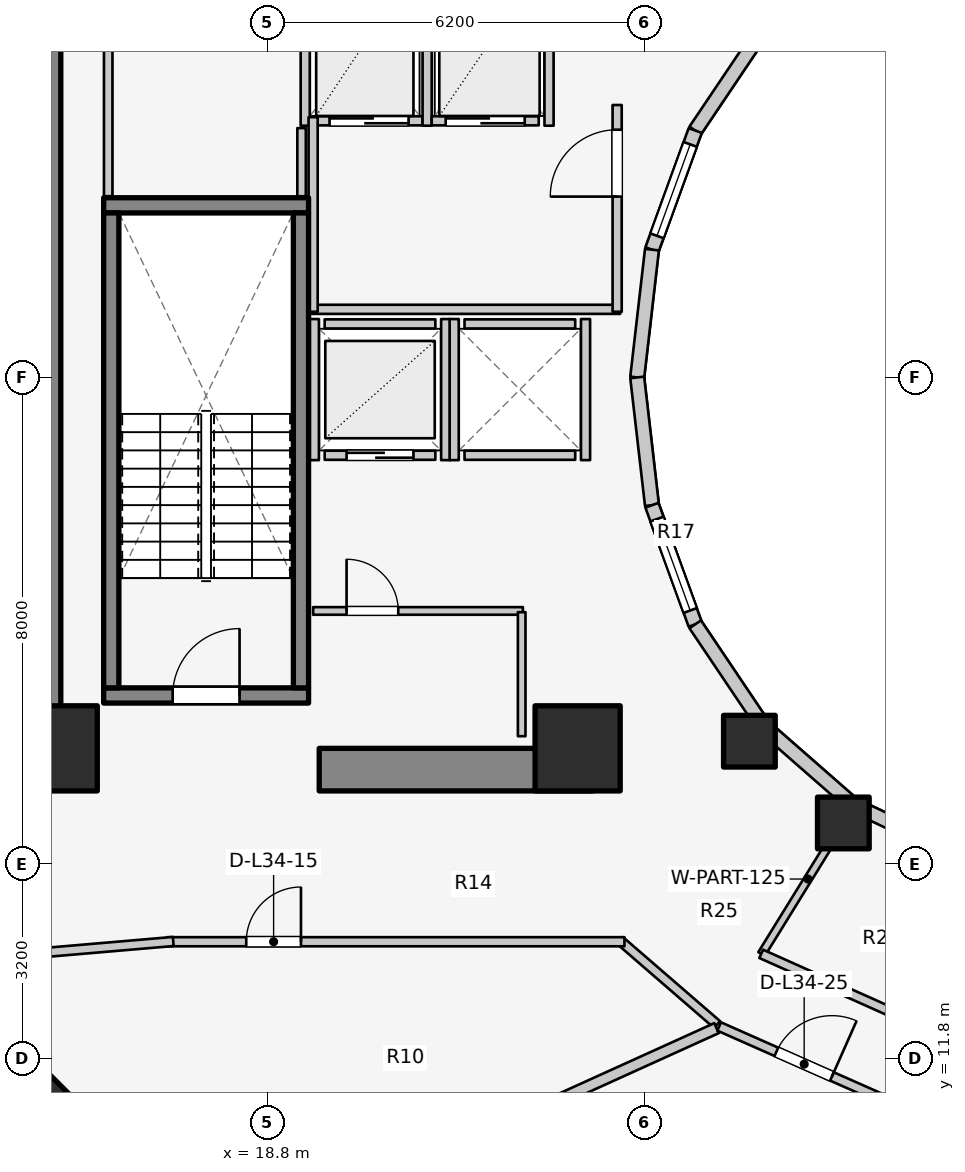
"""IFC4 building model, lengths in metres.
Left out: names, types, materials, properties, quantities, classifications, styles, units other than length and angle.
Written with IfcOpenShell. Run it as: python <this file> out.ifc"""

import sys

from ifc_helpers import new_model, si_unit, direction, frame, frame_2d, origin, origin_2d, place, context, subcontext, project, spatial, rectangle, extrude, element, fill, save


model = new_model("IFC4")
c1 = context("Model", 3, precision=1e-05, world=origin(), true_north=direction((0.0, 1.0)))
c2 = subcontext(c1, "Body", "Model", "MODEL_VIEW")
j1 = project(units=[si_unit("LENGTHUNIT", "METRE"), si_unit("PLANEANGLEUNIT", "RADIAN")], contexts=[c1])
p1 = place(None, origin())
s1 = spatial("IfcSite", under=j1, at=p1, CompositionType="ELEMENT")
p2 = place(p1, origin())
s2 = spatial("IfcBuilding", under=s1, at=p2, CompositionType="ELEMENT")
p3 = place(p2, frame((0.0, 0.0, 113.5)))
s3 = spatial("IfcBuildingStorey", under=s2, at=p3, CompositionType="ELEMENT", Elevation=113.5)
p4 = place(p3, frame((15.05, 17.05, 0.0), z_axis=(0.0, 0.0, 1.0), x_axis=(0.0, 1.0, 0.0)))
e1 = element("IfcWall", 1, at=p4, inside=s3, PredefinedType="SHEAR", context=c2, shape_type="SweptSolid", body=[
    extrude(rectangle(XDim=12.8, YDim=0.7, at=frame_2d((6.4, 0.0))), origin(), (0.0, 0.0, 1.0), 3.1),
])
p5 = place(p3, frame((19.65, 16.55, 0.0), z_axis=(0.0, 0.0, 1.0), x_axis=(1.0, 0.0, 0.0)))
e2 = element("IfcWall", 2, at=p5, inside=s3, PredefinedType="SHEAR", context=c2, shape_type="SweptSolid", body=[
    extrude(rectangle(XDim=4.5, YDim=0.7, at=frame_2d((2.25, 0.0))), origin(), (0.0, 0.0, 1.0), 3.1),
])
p6 = place(p3, frame((16.105, 17.77, 0.0), z_axis=(0.0, 0.0, 1.0), x_axis=(1.0, 0.0, 0.0)))
e3 = element("IfcWall", 3, at=p6, inside=s3, PredefinedType="SOLIDWALL", context=c2, shape_type="SweptSolid", body=[
    extrude(rectangle(XDim=3.37, YDim=0.25, at=frame_2d((1.685, 0.0))), origin(), (0.0, 0.0, 1.0), 3.1),
])
p7 = place(p6, frame((1.135, 0.0, 0.0)))
e4 = element("IfcOpeningElement", 4, at=p7, cuts=e3, PredefinedType="OPENING", context=c2, shape_type="SweptSolid", body=[
    extrude(rectangle(XDim=1.1, YDim=2.1, at=frame_2d((0.55, 1.05))), frame((0.0, 0.135, 0.0), z_axis=(0.0, -1.0, 0.0), x_axis=(1.0, 0.0, 0.0)), (0.0, 0.0, 1.0), 0.27),
])
p8 = place(p3, frame((16.105, 25.83, 0.0), z_axis=(0.0, 0.0, 1.0), x_axis=(1.0, 0.0, 0.0)))
e5 = element("IfcWall", 5, at=p8, inside=s3, PredefinedType="SOLIDWALL", context=c2, shape_type="SweptSolid", body=[
    extrude(rectangle(XDim=3.37, YDim=0.25, at=frame_2d((1.685, 0.0))), origin(), (0.0, 0.0, 1.0), 3.1),
])
for number, where, z_axis, x_axis in (
    (6, (16.23, 17.895, 0.0), (0.0, 0.0, 1.0), (0.0, 1.0, 0.0)),
    (7, (19.35, 17.895, 0.0), (0.0, 0.0, 1.0), (0.0, 1.0, 0.0)),
):
    element("IfcWall", number, at=place(p3, frame(where, z_axis=z_axis, x_axis=x_axis)), inside=s3, PredefinedType="SOLIDWALL", context=c2, shape_type="SweptSolid", body=[
        extrude(rectangle(XDim=7.81, YDim=0.25, at=frame_2d((3.905, 0.0))), origin(), (0.0, 0.0, 1.0), 3.1),
    ])
for number, where, z_axis, x_axis in (
    (8, (15.3, 16.9, 0.0), (0.0, 0.0, 1.0), (1.0, 0.0, 0.0)),
    (9, (23.9, 16.9, 0.0), (0.0, 0.0, 1.0), (1.0, 0.0, 0.0)),
):
    element("IfcColumn", number, at=place(p3, frame(where, z_axis=z_axis, x_axis=x_axis)), inside=s3, PredefinedType="COLUMN", context=c2, shape_type="SweptSolid", body=[
        extrude(rectangle(XDim=1.4, YDim=1.4, at=origin_2d()), origin(), (0.0, 0.0, 1.0), 3.1),
    ])
p9 = place(p3, frame((26.725, 17.018, 0.0), z_axis=(0.0, 0.0, 1.0), x_axis=(1.0, 0.0, 0.0)))
e10 = element("IfcColumn", 10, at=p9, inside=s3, PredefinedType="COLUMN", context=c2, shape_type="SweptSolid", body=[
    extrude(rectangle(XDim=0.85, YDim=0.85, at=origin_2d()), origin(), (0.0, 0.0, 1.0), 3.1),
])
p10 = place(p3, frame((15.147, 10.862, 0.0), z_axis=(0.0, 0.0, 1.0), x_axis=(-0.707106781187, -0.707106781187, 0.0)))
e11 = element("IfcColumn", 11, at=p10, inside=s3, PredefinedType="COLUMN", context=c2, shape_type="SweptSolid", body=[
    extrude(rectangle(XDim=1.05, YDim=1.05, at=origin_2d()), origin(), (0.0, 0.0, 1.0), 3.1),
])
p11 = place(p3, frame((28.27, 15.673, 0.0), z_axis=(0.0, 0.0, 1.0), x_axis=(1.0, 0.0, 0.0)))
e12 = element("IfcColumn", 12, at=p11, inside=s3, PredefinedType="COLUMN", context=c2, shape_type="SweptSolid", body=[
    extrude(rectangle(XDim=0.85, YDim=0.85, at=origin_2d()), origin(), (0.0, 0.0, 1.0), 3.1),
])
p12 = place(p3, frame((26.965, 28.742, 0.0), z_axis=(0.0, 0.0, 1.0), x_axis=(-0.558197800898, -0.829707909492, 0.0)))
e13 = element("IfcWall", 13, at=p12, inside=s3, PredefinedType="STANDARD", context=c2, shape_type="SweptSolid", body=[
    extrude(rectangle(XDim=2.027, YDim=0.23, at=frame_2d((1.013, 0.0))), origin(), (0.0, 0.0, 1.0), 2.16),
])
p13 = place(p3, frame((25.834, 27.06, 0.0), z_axis=(0.0, 0.0, 1.0), x_axis=(-0.341423187295, -0.93990968033, 0.0)))
e14 = element("IfcWall", 14, at=p13, inside=s3, PredefinedType="STANDARD", context=c2, shape_type="SweptSolid", body=[
    extrude(rectangle(XDim=2.084, YDim=0.23, at=frame_2d((1.042, 0.0))), origin(), (0.0, 0.0, 1.0), 2.84),
])
p14 = place(p13, frame((0.242, 0.0, 0.85)))
e15 = element("IfcOpeningElement", 15, at=p14, cuts=e14, PredefinedType="OPENING", context=c2, shape_type="SweptSolid", body=[
    extrude(rectangle(XDim=1.6, YDim=1.65, at=frame_2d((0.8, 0.825))), frame((0.0, 0.125, 0.0), z_axis=(0.0, -1.0, 0.0), x_axis=(1.0, 0.0, 0.0)), (0.0, 0.0, 1.0), 0.25),
])
for number, where, z_axis, x_axis in (
    (16, (25.123, 25.102, 0.0), (0.0, 0.0, 1.0), (-0.115, -0.993, 0.0)),
    (17, (24.88, 23.0, 0.0), (0.0, 0.0, 1.0), (0.115, -0.993, 0.0)),
):
    element("IfcWall", number, at=place(p3, frame(where, z_axis=z_axis, x_axis=x_axis)), inside=s3, PredefinedType="STANDARD", context=c2, shape_type="SweptSolid", body=[
        extrude(rectangle(XDim=2.115, YDim=0.23, at=frame_2d((1.058, 0.0))), origin(), (0.0, 0.0, 1.0), 2.84),
    ])
p15 = place(p3, frame((25.123, 20.898, 0.0), z_axis=(0.0, 0.0, 1.0), x_axis=(0.341423187295, -0.93990968033, 0.0)))
e18 = element("IfcWall", 18, at=p15, inside=s3, PredefinedType="STANDARD", context=c2, shape_type="SweptSolid", body=[
    extrude(rectangle(XDim=2.084, YDim=0.23, at=frame_2d((1.042, 0.0))), origin(), (0.0, 0.0, 1.0), 2.84),
])
p16 = place(p15, frame((0.242, 0.0, 0.85)))
e19 = element("IfcOpeningElement", 19, at=p16, cuts=e18, PredefinedType="OPENING", context=c2, shape_type="SweptSolid", body=[
    extrude(rectangle(XDim=1.6, YDim=1.65, at=frame_2d((0.8, 0.825))), frame((0.0, 0.125, 0.0), z_axis=(0.0, -1.0, 0.0), x_axis=(1.0, 0.0, 0.0)), (0.0, 0.0, 1.0), 0.25),
])
p17 = place(p3, frame((25.834, 18.94, 0.0), z_axis=(0.0, 0.0, 1.0), x_axis=(0.558197800898, -0.829707909492, 0.0)))
e20 = element("IfcWall", 20, at=p17, inside=s3, PredefinedType="STANDARD", context=c2, shape_type="SweptSolid", body=[
    extrude(rectangle(XDim=2.027, YDim=0.23, at=frame_2d((1.013, 0.0))), origin(), (0.0, 0.0, 1.0), 2.16),
])
p18 = place(p3, frame((26.965, 17.258, 0.0), z_axis=(0.0, 0.0, 1.0), x_axis=(0.752576694707, -0.658504607869, 0.0)))
e21 = element("IfcWall", 21, at=p18, inside=s3, PredefinedType="STANDARD", context=c2, shape_type="SweptSolid", body=[
    extrude(rectangle(XDim=1.959, YDim=0.23, at=frame_2d((0.98, 0.0))), origin(), (0.0, 0.0, 1.0), 2.16),
])
p19 = place(p3, frame((28.44, 15.968, 0.0), z_axis=(0.0, 0.0, 1.0), x_axis=(0.904179699603, -0.427152280606, 0.0)))
e22 = element("IfcWall", 22, at=p19, inside=s3, PredefinedType="STANDARD", context=c2, shape_type="SweptSolid", body=[
    extrude(rectangle(XDim=1.899, YDim=0.23, at=frame_2d((0.95, 0.0))), origin(), (0.0, 0.0, 1.0), 2.16),
])
p20 = place(p3, frame((19.74, 21.72, 0.0), z_axis=(0.0, 0.0, 1.0), x_axis=(1.0, 0.0, 0.0)))
e23 = element("IfcWall", 23, at=p20, inside=s3, PredefinedType="SOLIDWALL", context=c2, shape_type="SweptSolid", body=[
    extrude(rectangle(XDim=1.82, YDim=0.15, at=frame_2d((0.91, 0.0))), origin(), (0.0, 0.0, 1.0), 2.855),
])
p21 = place(p20, frame((0.36, 0.0, 0.0)))
e24 = element("IfcOpeningElement", 24, at=p21, cuts=e23, PredefinedType="OPENING", context=c2, shape_type="SweptSolid", body=[
    extrude(rectangle(XDim=1.1, YDim=2.1, at=frame_2d((0.55, 1.05))), frame((0.0, 0.085, 0.0), z_axis=(0.0, -1.0, 0.0), x_axis=(1.0, 0.0, 0.0)), (0.0, 0.0, 1.0), 0.17),
])
p22 = place(p3, frame((19.74, 23.88, 0.0), z_axis=(0.0, 0.0, 1.0), x_axis=(1.0, 0.0, 0.0)))
e25 = element("IfcWall", 25, at=p22, inside=s3, PredefinedType="SOLIDWALL", context=c2, shape_type="SweptSolid", body=[
    extrude(rectangle(XDim=1.82, YDim=0.15, at=frame_2d((0.91, 0.0))), origin(), (0.0, 0.0, 1.0), 2.855),
])
for number, where, z_axis, x_axis in (
    (26, (19.57, 21.64, 0.0), (0.0, 0.0, 1.0), (0.0, 1.0, 0.0)),
    (27, (21.73, 21.64, 0.0), (0.0, 0.0, 1.0), (0.0, 1.0, 0.0)),
):
    element("IfcWall", number, at=place(p3, frame(where, z_axis=z_axis, x_axis=x_axis)), inside=s3, PredefinedType="SOLIDWALL", context=c2, shape_type="SweptSolid", body=[
        extrude(rectangle(XDim=2.32, YDim=0.15, at=frame_2d((1.16, 0.0))), origin(), (0.0, 0.0, 1.0), 2.855),
    ])
for number, where, z_axis, x_axis in (
    (28, (22.04, 21.72, 0.0), (0.0, 0.0, 1.0), (1.0, 0.0, 0.0)),
    (29, (22.04, 23.88, 0.0), (0.0, 0.0, 1.0), (1.0, 0.0, 0.0)),
):
    element("IfcWall", number, at=place(p3, frame(where, z_axis=z_axis, x_axis=x_axis)), inside=s3, PredefinedType="SOLIDWALL", context=c2, shape_type="SweptSolid", body=[
        extrude(rectangle(XDim=1.82, YDim=0.15, at=frame_2d((0.91, 0.0))), origin(), (0.0, 0.0, 1.0), 2.12),
    ])
p23 = place(p3, frame((21.87, 21.64, 0.0), z_axis=(0.0, 0.0, 1.0), x_axis=(0.0, 1.0, 0.0)))
e30 = element("IfcWall", 30, at=p23, inside=s3, PredefinedType="SOLIDWALL", context=c2, shape_type="SweptSolid", body=[
    extrude(rectangle(XDim=2.32, YDim=0.15, at=frame_2d((1.16, 0.0))), origin(), (0.0, 0.0, 1.0), 2.855),
])
p24 = place(p3, frame((24.03, 21.64, 0.0), z_axis=(0.0, 0.0, 1.0), x_axis=(0.0, 1.0, 0.0)))
e31 = element("IfcWall", 31, at=p24, inside=s3, PredefinedType="SOLIDWALL", context=c2, shape_type="SweptSolid", body=[
    extrude(rectangle(XDim=2.32, YDim=0.15, at=frame_2d((1.16, 0.0))), origin(), (0.0, 0.0, 1.0), 2.12),
])
p25 = place(p3, frame((19.59, 27.22, 0.0), z_axis=(0.0, 0.0, 1.0), x_axis=(1.0, 0.0, 0.0)))
e32 = element("IfcWall", 32, at=p25, inside=s3, PredefinedType="SOLIDWALL", context=c2, shape_type="SweptSolid", body=[
    extrude(rectangle(XDim=1.76, YDim=0.15, at=frame_2d((0.88, 0.0))), origin(), (0.0, 0.0, 1.0), 2.855),
])
p26 = place(p25, frame((0.23, 0.0, 0.0)))
e33 = element("IfcOpeningElement", 33, at=p26, cuts=e32, PredefinedType="OPENING", context=c2, shape_type="SweptSolid", body=[
    extrude(rectangle(XDim=1.3, YDim=2.1, at=frame_2d((0.65, 1.05))), frame((0.0, 0.085, 0.0), z_axis=(0.0, -1.0, 0.0), x_axis=(1.0, 0.0, 0.0)), (0.0, 0.0, 1.0), 0.17),
])
for number, where, z_axis, x_axis in (
    (34, (19.42, 27.14, 0.0), (0.0, 0.0, 1.0), (0.0, 1.0, 0.0)),
    (35, (21.425, 27.14, 0.0), (0.0, 0.0, 1.0), (0.0, 1.0, 0.0)),
):
    element("IfcWall", number, at=place(p3, frame(where, z_axis=z_axis, x_axis=x_axis)), inside=s3, PredefinedType="SOLIDWALL", context=c2, shape_type="SweptSolid", body=[
        extrude(rectangle(XDim=2.72, YDim=0.15, at=frame_2d((1.36, 0.0))), origin(), (0.0, 0.0, 1.0), 2.855),
    ])
p27 = place(p3, frame((21.5, 27.22, 0.0), z_axis=(0.0, 0.0, 1.0), x_axis=(1.0, 0.0, 0.0)))
e36 = element("IfcWall", 36, at=p27, inside=s3, PredefinedType="SOLIDWALL", context=c2, shape_type="SweptSolid", body=[
    extrude(rectangle(XDim=1.76, YDim=0.15, at=frame_2d((0.88, 0.0))), origin(), (0.0, 0.0, 1.0), 2.855),
])
p28 = place(p27, frame((0.23, 0.0, 0.0)))
e37 = element("IfcOpeningElement", 37, at=p28, cuts=e36, PredefinedType="OPENING", context=c2, shape_type="SweptSolid", body=[
    extrude(rectangle(XDim=1.3, YDim=2.1, at=frame_2d((0.65, 1.05))), frame((0.0, 0.085, 0.0), z_axis=(0.0, -1.0, 0.0), x_axis=(1.0, 0.0, 0.0)), (0.0, 0.0, 1.0), 0.17),
])
p29 = place(p3, frame((23.43, 27.14, 0.0), z_axis=(0.0, 0.0, 1.0), x_axis=(0.0, 1.0, 0.0)))
e38 = element("IfcWall", 38, at=p29, inside=s3, PredefinedType="SOLIDWALL", context=c2, shape_type="SweptSolid", body=[
    extrude(rectangle(XDim=2.72, YDim=0.15, at=frame_2d((1.36, 0.0))), origin(), (0.0, 0.0, 1.0), 2.855),
])
p30 = place(p3, frame((19.52, 24.12, 0.0), z_axis=(0.0, 0.0, 1.0), x_axis=(1.0, 0.0, 0.0)))
e39 = element("IfcWall", 39, at=p30, inside=s3, PredefinedType="PARTITIONING", context=c2, shape_type="SweptSolid", body=[
    extrude(rectangle(XDim=5.08, YDim=0.15, at=frame_2d((2.54, 0.0))), origin(), (0.0, 0.0, 1.0), 2.12),
])
p31 = place(p3, frame((19.55, 24.08, 0.0), z_axis=(0.0, 0.0, 1.0), x_axis=(0.0, 1.0, 0.0)))
e40 = element("IfcWall", 40, at=p31, inside=s3, PredefinedType="PARTITIONING", context=c2, shape_type="SweptSolid", body=[
    extrude(rectangle(XDim=3.2, YDim=0.15, at=frame_2d((1.6, 0.0))), origin(), (0.0, 0.0, 1.0), 2.855),
])
p32 = place(p3, frame((24.55, 24.08, 0.0), z_axis=(0.0, 0.0, 1.0), x_axis=(0.0, 1.0, 0.0)))
e41 = element("IfcWall", 41, at=p32, inside=s3, PredefinedType="PARTITIONING", context=c2, shape_type="SweptSolid", body=[
    extrude(rectangle(XDim=3.4, YDim=0.15, at=frame_2d((1.7, 0.0))), origin(), (0.0, 0.0, 1.0), 2.855),
])
p33 = place(p32, frame((1.894, 0.0, 0.0)))
e42 = element("IfcOpeningElement", 42, at=p33, cuts=e41, PredefinedType="OPENING", context=c2, shape_type="SweptSolid", body=[
    extrude(rectangle(XDim=1.1, YDim=2.1, at=frame_2d((0.55, 1.05))), frame((0.0, 0.085, 0.0), z_axis=(0.0, -1.0, 0.0), x_axis=(1.0, 0.0, 0.0)), (0.0, 0.0, 1.0), 0.17),
])
p34 = place(p3, frame((19.55, 19.16, 0.0), z_axis=(0.0, 0.0, 1.0), x_axis=(1.0, 0.0, 0.0)))
e43 = element("IfcWall", 43, at=p34, inside=s3, PredefinedType="PARTITIONING", context=c2, shape_type="SweptSolid", body=[
    extrude(rectangle(XDim=3.45, YDim=0.125, at=frame_2d((1.725, 0.0))), origin(), (0.0, 0.0, 1.0), 2.12),
])
p35 = place(p34, frame((0.55, 0.0, 0.0)))
e44 = element("IfcOpeningElement", 44, at=p35, cuts=e43, PredefinedType="OPENING", context=c2, shape_type="SweptSolid", body=[
    extrude(rectangle(XDim=0.85, YDim=2.05, at=frame_2d((0.425, 1.025))), frame((0.0, 0.073, 0.0), z_axis=(0.0, -1.0, 0.0), x_axis=(1.0, 0.0, 0.0)), (0.0, 0.0, 1.0), 0.145),
])
p36 = place(p3, frame((22.98, 17.1, 0.0), z_axis=(0.0, 0.0, 1.0), x_axis=(0.0, 1.0, 0.0)))
e45 = element("IfcWall", 45, at=p36, inside=s3, PredefinedType="PARTITIONING", context=c2, shape_type="SweptSolid", body=[
    extrude(rectangle(XDim=2.04, YDim=0.125, at=frame_2d((1.02, 0.0))), origin(), (0.0, 0.0, 1.0), 2.855),
])
p37 = place(p3, frame((16.18, 25.98, 0.0), z_axis=(0.0, 0.0, 1.0), x_axis=(0.0, 1.0, 0.0)))
e46 = element("IfcWall", 46, at=p37, inside=s3, PredefinedType="PLUMBINGWALL", context=c2, shape_type="SweptSolid", body=[
    extrude(rectangle(XDim=3.88, YDim=0.14, at=frame_2d((1.94, 0.0))), origin(), (0.0, 0.0, 1.0), 2.855),
])
p38 = place(p3, frame((19.36, 25.98, 0.0), z_axis=(0.0, 0.0, 1.0), x_axis=(0.0, 1.0, 0.0)))
e47 = element("IfcWall", 47, at=p38, inside=s3, PredefinedType="PLUMBINGWALL", context=c2, shape_type="SweptSolid", body=[
    extrude(rectangle(XDim=1.12, YDim=0.14, at=frame_2d((0.56, 0.0))), origin(), (0.0, 0.0, 1.0), 2.855),
])
p39 = place(p3, frame((26.193, 12.358, 0.0), z_axis=(0.0, 0.0, 1.0), x_axis=(-0.756055312247, 0.654507727092, 0.0)))
e48 = element("IfcWall", 48, at=p39, inside=s3, PredefinedType="PARTITIONING", context=c2, shape_type="SweptSolid", body=[
    extrude(rectangle(XDim=2.111, YDim=0.15, at=frame_2d((1.055, 0.0))), origin(), (0.0, 0.0, 1.0), 2.272),
])
p40 = place(p3, frame((17.15, 13.72, 0.0), z_axis=(0.0, 0.0, 1.0), x_axis=(1.0, 0.0, 0.0)))
e49 = element("IfcWall", 49, at=p40, inside=s3, PredefinedType="PARTITIONING", context=c2, shape_type="SweptSolid", body=[
    extrude(rectangle(XDim=7.52, YDim=0.15, at=frame_2d((3.76, 0.0))), origin(), (0.0, 0.0, 1.0), 2.272),
])
p41 = place(p40, frame((1.3, 0.0, 0.0)))
e50 = element("IfcOpeningElement", 50, at=p41, cuts=e49, PredefinedType="OPENING", context=c2, shape_type="SweptSolid", body=[
    extrude(rectangle(XDim=0.9, YDim=2.1, at=frame_2d((0.45, 1.05))), frame((0.0, 0.085, 0.0), z_axis=(0.0, -1.0, 0.0), x_axis=(1.0, 0.0, 0.0)), (0.0, 0.0, 1.0), 0.17),
])
p42 = place(p3, frame((17.25, 13.724, 0.0), z_axis=(0.0, 0.0, 1.0), x_axis=(-0.996341886029, -0.085456691633, 0.0)))
e51 = element("IfcWall", 51, at=p42, inside=s3, PredefinedType="PARTITIONING", context=c2, shape_type="SweptSolid", body=[
    extrude(rectangle(XDim=6.108, YDim=0.15, at=frame_2d((3.054, 0.0))), origin(), (0.0, 0.0, 1.0), 2.142),
])
p43 = place(p3, frame((28.45, 15.985, 0.0), z_axis=(0.0, 0.0, 1.0), x_axis=(-0.525627246902, -0.850714991824, 0.0)))
e52 = element("IfcWall", 52, at=p43, inside=s3, PredefinedType="PARTITIONING", context=c2, shape_type="SweptSolid", body=[
    extrude(rectangle(XDim=2.901, YDim=0.125, at=frame_2d((1.451, 0.0))), origin(), (0.0, 0.0, 1.0), 2.272),
])
p44 = place(p3, frame((26.919, 13.521, 0.0), z_axis=(0.0, 0.0, 1.0), x_axis=(0.912888568324, -0.408208845842, 0.0)))
e53 = element("IfcWall", 53, at=p44, inside=s3, PredefinedType="PARTITIONING", context=c2, shape_type="SweptSolid", body=[
    extrude(rectangle(XDim=2.69, YDim=0.15, at=frame_2d((1.345, 0.0))), origin(), (0.0, 0.0, 1.0), 2.272),
])
p45 = place(p3, frame((26.185, 12.299, 0.0), z_axis=(0.0, 0.0, 1.0), x_axis=(-0.910720488346, -0.413023234342, 0.0)))
e54 = element("IfcWall", 54, at=p45, inside=s3, PredefinedType="PARTITIONING", context=c2, shape_type="SweptSolid", body=[
    extrude(rectangle(XDim=7.456, YDim=0.18, at=frame_2d((3.728, 0.0))), origin(), (0.0, 0.0, 1.0), 2.272),
])
p46 = place(p3, frame((26.228, 12.326, 0.0), z_axis=(0.0, 0.0, 1.0), x_axis=(0.914324470734, -0.404982422108, 0.0)))
e55 = element("IfcWall", 55, at=p46, inside=s3, PredefinedType="PARTITIONING", context=c2, shape_type="SweptSolid", body=[
    extrude(rectangle(XDim=3.058, YDim=0.15, at=frame_2d((1.529, 0.0))), origin(), (0.0, 0.0, 1.0), 2.272),
])
p47 = place(p46, frame((1.029, 0.0, 0.0)))
e56 = element("IfcOpeningElement", 56, at=p47, cuts=e55, PredefinedType="OPENING", context=c2, shape_type="SweptSolid", body=[
    extrude(rectangle(XDim=1.0, YDim=2.1, at=frame_2d((0.5, 1.05))), frame((0.0, 0.085, 0.0), z_axis=(0.0, -1.0, 0.0), x_axis=(1.0, 0.0, 0.0)), (0.0, 0.0, 1.0), 0.17),
])
p48 = place(p14, origin())
e57 = element("IfcWindow", 57, at=p48, inside=s3, PartitioningType="SINGLE_PANEL", PredefinedType="WINDOW", context=c2, shape_type="SweptSolid", body=[
    extrude(rectangle(XDim=1.6, YDim=1.65, at=frame_2d((0.8, 0.825))), frame((0.0, 0.03, 0.0), z_axis=(0.0, -1.0, 0.0), x_axis=(1.0, 0.0, 0.0)), (0.0, 0.0, 1.0), 0.06),
])
fill(e15, e57)
p49 = place(p16, origin())
e58 = element("IfcWindow", 58, at=p49, inside=s3, PartitioningType="SINGLE_PANEL", PredefinedType="WINDOW", context=c2, shape_type="SweptSolid", body=[
    extrude(rectangle(XDim=1.6, YDim=1.65, at=frame_2d((0.8, 0.825))), frame((0.0, 0.03, 0.0), z_axis=(0.0, -1.0, 0.0), x_axis=(1.0, 0.0, 0.0)), (0.0, 0.0, 1.0), 0.06),
])
fill(e19, e58)
p50 = place(p7, origin())
e59 = element("IfcDoor", 59, at=p50, inside=s3, OperationType="SINGLE_SWING_RIGHT", PredefinedType="DOOR", context=c2, shape_type="SweptSolid", body=[
    extrude(rectangle(XDim=1.1, YDim=2.1, at=frame_2d((0.55, 1.05))), frame((0.0, 0.025, 0.0), z_axis=(0.0, -1.0, 0.0), x_axis=(1.0, 0.0, 0.0)), (0.0, 0.0, 1.0), 0.05),
])
fill(e4, e59)
p51 = place(p21, origin())
e60 = element("IfcDoor", 60, at=p51, inside=s3, OperationType="DOUBLE_DOOR_SLIDING", PredefinedType="DOOR", context=c2, shape_type="SweptSolid", body=[
    extrude(rectangle(XDim=1.1, YDim=2.1, at=frame_2d((0.55, 1.05))), frame((0.0, 0.025, 0.0), z_axis=(0.0, -1.0, 0.0), x_axis=(1.0, 0.0, 0.0)), (0.0, 0.0, 1.0), 0.05),
])
fill(e24, e60)
p52 = place(p26, origin())
e61 = element("IfcDoor", 61, at=p52, inside=s3, OperationType="DOUBLE_DOOR_SLIDING", PredefinedType="DOOR", context=c2, shape_type="SweptSolid", body=[
    extrude(rectangle(XDim=1.3, YDim=2.1, at=frame_2d((0.65, 1.05))), frame((0.0, 0.025, 0.0), z_axis=(0.0, -1.0, 0.0), x_axis=(1.0, 0.0, 0.0)), (0.0, 0.0, 1.0), 0.05),
])
fill(e33, e61)
p53 = place(p28, origin())
e62 = element("IfcDoor", 62, at=p53, inside=s3, OperationType="DOUBLE_DOOR_SLIDING", PredefinedType="DOOR", context=c2, shape_type="SweptSolid", body=[
    extrude(rectangle(XDim=1.3, YDim=2.1, at=frame_2d((0.65, 1.05))), frame((0.0, 0.025, 0.0), z_axis=(0.0, -1.0, 0.0), x_axis=(1.0, 0.0, 0.0)), (0.0, 0.0, 1.0), 0.05),
])
fill(e37, e62)
p54 = place(p33, origin())
e63 = element("IfcDoor", 63, at=p54, inside=s3, OperationType="SINGLE_SWING_LEFT", PredefinedType="DOOR", context=c2, shape_type="SweptSolid", body=[
    extrude(rectangle(XDim=1.1, YDim=2.1, at=frame_2d((0.55, 1.05))), frame((0.0, 0.025, 0.0), z_axis=(0.0, -1.0, 0.0), x_axis=(1.0, 0.0, 0.0)), (0.0, 0.0, 1.0), 0.05),
])
fill(e42, e63)
p55 = place(p35, origin())
e64 = element("IfcDoor", 64, at=p55, inside=s3, OperationType="SINGLE_SWING_LEFT", PredefinedType="DOOR", context=c2, shape_type="SweptSolid", body=[
    extrude(rectangle(XDim=0.85, YDim=2.05, at=frame_2d((0.425, 1.025))), frame((0.0, 0.025, 0.0), z_axis=(0.0, -1.0, 0.0), x_axis=(1.0, 0.0, 0.0)), (0.0, 0.0, 1.0), 0.05),
])
fill(e44, e64)
p56 = place(p41, origin())
e65 = element("IfcDoor", 65, at=p56, inside=s3, OperationType="SINGLE_SWING_RIGHT", PredefinedType="DOOR", context=c2, shape_type="SweptSolid", body=[
    extrude(rectangle(XDim=0.9, YDim=2.1, at=frame_2d((0.45, 1.05))), frame((0.0, 0.025, 0.0), z_axis=(0.0, -1.0, 0.0), x_axis=(1.0, 0.0, 0.0)), (0.0, 0.0, 1.0), 0.05),
])
fill(e50, e65)
p57 = place(p47, origin())
e66 = element("IfcDoor", 66, at=p57, inside=s3, OperationType="SINGLE_SWING_RIGHT", PredefinedType="DOOR", context=c2, shape_type="SweptSolid", body=[
    extrude(rectangle(XDim=1.0, YDim=2.1, at=frame_2d((0.5, 1.05))), frame((0.0, 0.025, 0.0), z_axis=(0.0, -1.0, 0.0), x_axis=(1.0, 0.0, 0.0)), (0.0, 0.0, 1.0), 0.05),
])
fill(e56, e66)
save(model, sys.argv[1])
